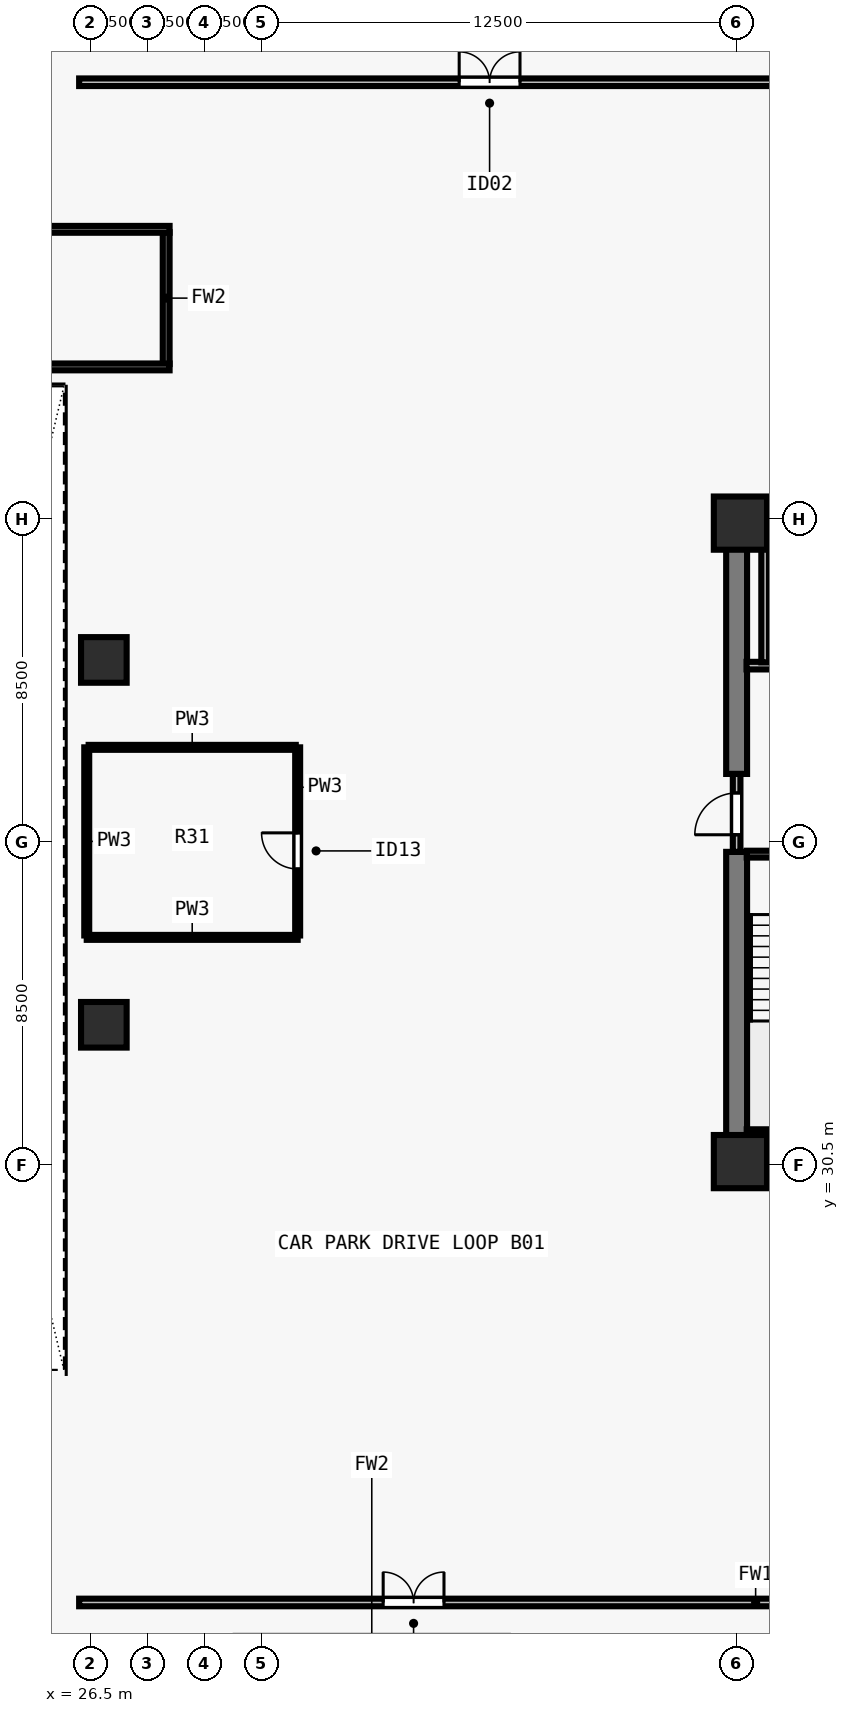
"""IFC4 building model, lengths in metres.
Left out: names, types, materials, properties, quantities, classifications, styles, units other than length and angle.
Written with IfcOpenShell. Run it as: python <this file> out.ifc"""

import sys

from ifc_helpers import new_model, si_unit, direction, frame, frame_2d, origin, origin_2d, place, context, subcontext, project, spatial, rectangle, extrude, element, fill, save


model = new_model("IFC4")
c1 = context("Model", 3, precision=1e-05, world=origin(), true_north=direction((0.0, 1.0)))
c2 = subcontext(c1, "Body", "Model", "MODEL_VIEW")
j1 = project(units=[si_unit("LENGTHUNIT", "METRE"), si_unit("PLANEANGLEUNIT", "RADIAN")], contexts=[c1])
p1 = place(None, origin())
s1 = spatial("IfcSite", under=j1, at=p1, CompositionType="ELEMENT")
p2 = place(p1, origin())
s2 = spatial("IfcBuilding", under=s1, at=p2, CompositionType="ELEMENT")
p3 = place(p2, frame((0.0, 0.0, -4.0)))
s3 = spatial("IfcBuildingStorey", under=s2, at=p3, CompositionType="ELEMENT", Elevation=-4.0)
for number, where, z_axis, x_axis in (
    (1, (43.6, 30.6, 0.0), (0.0, 0.0, 1.0), (1.0, 0.0, 0.0)),
    (2, (43.6, 47.4, 0.0), (0.0, 0.0, 1.0), (1.0, 0.0, 0.0)),
):
    element("IfcColumn", number, at=place(p3, frame(where, z_axis=z_axis, x_axis=x_axis)), inside=s3, PredefinedType="COLUMN", context=c2, shape_type="SweptSolid", body=[
        extrude(rectangle(XDim=1.4, YDim=1.4, at=origin_2d()), origin(), (0.0, 0.0, 1.0), 4.0),
    ])
for number, where, z_axis, x_axis in (
    (3, (26.85, 43.8, 0.0), (0.0, 0.0, 1.0), (1.0, 0.0, 0.0)),
    (4, (26.85, 34.2, 0.0), (0.0, 0.0, 1.0), (1.0, 0.0, 0.0)),
):
    element("IfcColumn", number, at=place(p3, frame(where, z_axis=z_axis, x_axis=x_axis)), inside=s3, PredefinedType="COLUMN", context=c2, shape_type="SweptSolid", body=[
        extrude(rectangle(XDim=1.2, YDim=1.2, at=origin_2d()), origin(), (0.0, 0.0, 1.0), 4.0),
    ])
for number, where, z_axis, x_axis in (
    (5, (43.225, 30.5, 0.0), (0.0, 0.0, 1.0), (1.0, 0.0, 0.0)),
    (6, (43.225, 47.5, 0.0), (0.0, 0.0, 1.0), (1.0, 0.0, 0.0)),
):
    element("IfcWall", number, at=place(p3, frame(where, z_axis=z_axis, x_axis=x_axis)), inside=s3, PredefinedType="SHEAR", context=c2, shape_type="SweptSolid", body=[
        extrude(rectangle(XDim=17.55, YDim=0.55, at=frame_2d((8.775, 0.0))), origin(), (0.0, 0.0, 1.0), 3.7),
    ])
p4 = place(p3, frame((43.5, 30.765, 0.0), z_axis=(0.0, 0.0, 1.0), x_axis=(0.0, 1.0, 0.0)))
e7 = element("IfcWall", 7, at=p4, inside=s3, PredefinedType="SHEAR", context=c2, shape_type="SweptSolid", body=[
    extrude(rectangle(XDim=7.985, YDim=0.55, at=frame_2d((3.993, 0.0))), origin(), (0.0, 0.0, 1.0), 3.7),
])
p5 = place(p3, frame((43.5, 40.8, 0.0), z_axis=(0.0, 0.0, 1.0), x_axis=(0.0, 1.0, 0.0)))
e8 = element("IfcWall", 8, at=p5, inside=s3, PredefinedType="SHEAR", context=c2, shape_type="SweptSolid", body=[
    extrude(rectangle(XDim=6.435, YDim=0.55, at=frame_2d((3.218, 0.0))), origin(), (0.0, 0.0, 1.0), 3.7),
])
p6 = place(p3, frame((43.5, 38.75, 0.0), z_axis=(0.0, 0.0, 1.0), x_axis=(0.0, 1.0, 0.0)))
e9 = element("IfcWall", 9, at=p6, inside=s3, PredefinedType="SOLIDWALL", context=c2, shape_type="SweptSolid", body=[
    extrude(rectangle(XDim=2.05, YDim=0.2, at=frame_2d((1.025, 0.0))), origin(), (0.0, 0.0, 1.0), 3.7),
])
p7 = place(p6, frame((0.45, 0.0, 0.0)))
e10 = element("IfcOpeningElement", 10, at=p7, cuts=e9, PredefinedType="OPENING", context=c2, shape_type="SweptSolid", body=[
    extrude(rectangle(XDim=1.1, YDim=2.15, at=frame_2d((0.55, 1.075))), frame((0.0, 0.11, 0.0), z_axis=(0.0, -1.0, 0.0), x_axis=(1.0, 0.0, 0.0)), (0.0, 0.0, 1.0), 0.22),
])
p8 = place(p3, frame((43.76, 43.65, 0.0), z_axis=(0.0, 0.0, 1.0), x_axis=(1.0, 0.0, 0.0)))
e11 = element("IfcWall", 11, at=p8, inside=s3, PredefinedType="SOLIDWALL", context=c2, shape_type="SweptSolid", body=[
    extrude(rectangle(XDim=3.505, YDim=0.2, at=frame_2d((1.752, 0.0))), origin(), (0.0, 0.0, 1.0), 3.7),
])
p9 = place(p8, frame((1.11, 0.0, 0.0)))
e12 = element("IfcOpeningElement", 12, at=p9, cuts=e11, PredefinedType="OPENING", context=c2, shape_type="SweptSolid", body=[
    extrude(rectangle(XDim=1.1, YDim=2.2, at=frame_2d((0.55, 1.1))), frame((0.0, 0.11, 0.0), z_axis=(0.0, -1.0, 0.0), x_axis=(1.0, 0.0, 0.0)), (0.0, 0.0, 1.0), 0.22),
])
p10 = place(p3, frame((44.25, 43.735, 0.0), z_axis=(0.0, 0.0, 1.0), x_axis=(0.0, 1.0, 0.0)))
e13 = element("IfcWall", 13, at=p10, inside=s3, PredefinedType="SOLIDWALL", context=c2, shape_type="SweptSolid", body=[
    extrude(rectangle(XDim=3.505, YDim=0.2, at=frame_2d((1.752, 0.0))), origin(), (0.0, 0.0, 1.0), 3.7),
])
p11 = place(p3, frame((26.2, 19.0, 0.0), z_axis=(0.0, 0.0, 1.0), x_axis=(1.0, 0.0, 0.0)))
e14 = element("IfcWall", 14, at=p11, inside=s3, PredefinedType="SOLIDWALL", context=c2, shape_type="SweptSolid", body=[
    extrude(rectangle(XDim=51.6, YDim=0.2, at=frame_2d((25.8, 0.0))), origin(), (0.0, 0.0, 1.0), 3.218),
])
p12 = place(p11, frame((8.0, 0.0, 0.0)))
e15 = element("IfcOpeningElement", 15, at=p12, cuts=e14, PredefinedType="OPENING", context=c2, shape_type="SweptSolid", body=[
    extrude(rectangle(XDim=1.6, YDim=2.2, at=frame_2d((0.8, 1.1))), frame((0.0, 0.11, 0.0), z_axis=(0.0, -1.0, 0.0), x_axis=(1.0, 0.0, 0.0)), (0.0, 0.0, 1.0), 0.22),
])
p13 = place(p11, frame((26.0, 0.0, 0.0)))
e16 = element("IfcOpeningElement", 16, at=p13, cuts=e14, PredefinedType="OPENING", context=c2, shape_type="SweptSolid", body=[
    extrude(rectangle(XDim=1.6, YDim=2.2, at=frame_2d((0.8, 1.1))), frame((0.0, 0.11, 0.0), z_axis=(0.0, -1.0, 0.0), x_axis=(1.0, 0.0, 0.0)), (0.0, 0.0, 1.0), 0.22),
])
p14 = place(p11, frame((42.0, 0.0, 0.0)))
e17 = element("IfcOpeningElement", 17, at=p14, cuts=e14, PredefinedType="OPENING", context=c2, shape_type="SweptSolid", body=[
    extrude(rectangle(XDim=1.6, YDim=2.2, at=frame_2d((0.8, 1.1))), frame((0.0, 0.11, 0.0), z_axis=(0.0, -1.0, 0.0), x_axis=(1.0, 0.0, 0.0)), (0.0, 0.0, 1.0), 0.22),
])
p15 = place(p3, frame((26.2, 59.0, 0.0), z_axis=(0.0, 0.0, 1.0), x_axis=(1.0, 0.0, 0.0)))
e18 = element("IfcWall", 18, at=p15, inside=s3, PredefinedType="SOLIDWALL", context=c2, shape_type="SweptSolid", body=[
    extrude(rectangle(XDim=51.6, YDim=0.2, at=frame_2d((25.8, 0.0))), origin(), (0.0, 0.0, 1.0), 3.218),
])
p16 = place(p15, frame((10.0, 0.0, 0.0)))
e19 = element("IfcOpeningElement", 19, at=p16, cuts=e18, PredefinedType="OPENING", context=c2, shape_type="SweptSolid", body=[
    extrude(rectangle(XDim=1.6, YDim=2.2, at=frame_2d((0.8, 1.1))), frame((0.0, 0.11, 0.0), z_axis=(0.0, -1.0, 0.0), x_axis=(1.0, 0.0, 0.0)), (0.0, 0.0, 1.0), 0.22),
])
p17 = place(p15, frame((36.0, 0.0, 0.0)))
e20 = element("IfcOpeningElement", 20, at=p17, cuts=e18, PredefinedType="OPENING", context=c2, shape_type="SweptSolid", body=[
    extrude(rectangle(XDim=1.6, YDim=2.2, at=frame_2d((0.8, 1.1))), frame((0.0, 0.11, 0.0), z_axis=(0.0, -1.0, 0.0), x_axis=(1.0, 0.0, 0.0)), (0.0, 0.0, 1.0), 0.22),
])
p18 = place(p3, frame((26.4, 36.5, 0.0), z_axis=(0.0, 0.0, 1.0), x_axis=(1.0, 0.0, 0.0)))
e21 = element("IfcWall", 21, at=p18, inside=s3, PredefinedType="PLUMBINGWALL", context=c2, shape_type="SweptSolid", body=[
    extrude(rectangle(XDim=5.55, YDim=0.13, at=frame_2d((2.775, 0.0))), origin(), (0.0, 0.0, 1.0), 3.7),
])
p19 = place(p3, frame((26.4, 36.55, 0.0), z_axis=(0.0, 0.0, 1.0), x_axis=(0.0, 1.0, 0.0)))
e22 = element("IfcWall", 22, at=p19, inside=s3, PredefinedType="PLUMBINGWALL", context=c2, shape_type="SweptSolid", body=[
    extrude(rectangle(XDim=4.95, YDim=0.13, at=frame_2d((2.475, 0.0))), origin(), (0.0, 0.0, 1.0), 3.7),
])
p20 = place(p3, frame((31.95, 36.55, 0.0), z_axis=(0.0, 0.0, 1.0), x_axis=(0.0, 1.0, 0.0)))
e23 = element("IfcWall", 23, at=p20, inside=s3, PredefinedType="PLUMBINGWALL", context=c2, shape_type="SweptSolid", body=[
    extrude(rectangle(XDim=4.95, YDim=0.13, at=frame_2d((2.475, 0.0))), origin(), (0.0, 0.0, 1.0), 3.7),
])
p21 = place(p20, frame((1.75, 0.0, 0.0)))
e24 = element("IfcOpeningElement", 24, at=p21, cuts=e23, PredefinedType="OPENING", context=c2, shape_type="SweptSolid", body=[
    extrude(rectangle(XDim=0.95, YDim=2.1, at=frame_2d((0.475, 1.05))), frame((0.0, 0.075, 0.0), z_axis=(0.0, -1.0, 0.0), x_axis=(1.0, 0.0, 0.0)), (0.0, 0.0, 1.0), 0.15),
])
p22 = place(p3, frame((26.45, 41.5, 0.0), z_axis=(0.0, 0.0, 1.0), x_axis=(1.0, 0.0, 0.0)))
e25 = element("IfcWall", 25, at=p22, inside=s3, PredefinedType="PLUMBINGWALL", context=c2, shape_type="SweptSolid", body=[
    extrude(rectangle(XDim=5.45, YDim=0.13, at=frame_2d((2.725, 0.0))), origin(), (0.0, 0.0, 1.0), 3.7),
])
p23 = place(p3, frame((28.49, 51.585, 0.0), z_axis=(0.0, 0.0, 1.0), x_axis=(0.0, 1.0, 0.0)))
e26 = element("IfcWall", 26, at=p23, inside=s3, PredefinedType="SOLIDWALL", context=c2, shape_type="SweptSolid", body=[
    extrude(rectangle(XDim=3.47, YDim=0.18, at=frame_2d((1.735, 0.0))), origin(), (0.0, 0.0, 1.0), 3.7),
])
for number, where, z_axis, x_axis in (
    (27, (21.12, 51.51, 0.0), (0.0, 0.0, 1.0), (1.0, 0.0, 0.0)),
    (28, (21.12, 55.13, 0.0), (0.0, 0.0, 1.0), (1.0, 0.0, 0.0)),
):
    element("IfcWall", number, at=place(p3, frame(where, z_axis=z_axis, x_axis=x_axis)), inside=s3, PredefinedType="SOLIDWALL", context=c2, shape_type="SweptSolid", body=[
        extrude(rectangle(XDim=7.46, YDim=0.18, at=frame_2d((3.73, 0.0))), origin(), (0.0, 0.0, 1.0), 3.7),
    ])
p24 = place(p3, frame((43.765, 38.69, 0.0), z_axis=(0.0, 0.0, 1.0), x_axis=(1.0, 0.0, 0.0)))
e29 = element("IfcWall", 29, at=p24, inside=s3, PredefinedType="SOLIDWALL", context=c2, shape_type="SweptSolid", body=[
    extrude(rectangle(XDim=3.23, YDim=0.18, at=frame_2d((1.615, 0.0))), origin(), (0.0, 0.0, 1.0), 3.7),
])
p25 = place(p24, frame((1.14, 0.0, 0.0)))
e30 = element("IfcOpeningElement", 30, at=p25, cuts=e29, PredefinedType="OPENING", context=c2, shape_type="SweptSolid", body=[
    extrude(rectangle(XDim=0.95, YDim=2.15, at=frame_2d((0.475, 1.075))), frame((0.0, 0.1, 0.0), z_axis=(0.0, -1.0, 0.0), x_axis=(1.0, 0.0, 0.0)), (0.0, 0.0, 1.0), 0.2),
])
p26 = place(p3, frame((43.765, 31.36, 0.0), z_axis=(0.0, 0.0, 1.0), x_axis=(1.0, 0.0, 0.0)))
e31 = element("IfcWall", 31, at=p26, inside=s3, PredefinedType="SOLIDWALL", context=c2, shape_type="SweptSolid", body=[
    extrude(rectangle(XDim=3.23, YDim=0.18, at=frame_2d((1.615, 0.0))), origin(), (0.0, 0.0, 1.0), 3.7),
])
p27 = place(p7, origin())
e32 = element("IfcDoor", 32, at=p27, inside=s3, OperationType="SINGLE_SWING_LEFT", PredefinedType="DOOR", context=c2, shape_type="SweptSolid", body=[
    extrude(rectangle(XDim=1.1, YDim=2.15, at=frame_2d((0.55, 1.075))), frame((0.0, 0.025, 0.0), z_axis=(0.0, -1.0, 0.0), x_axis=(1.0, 0.0, 0.0)), (0.0, 0.0, 1.0), 0.05),
])
fill(e10, e32)
p28 = place(p12, origin())
e33 = element("IfcDoor", 33, at=p28, inside=s3, OperationType="DOUBLE_DOOR_SINGLE_SWING", PredefinedType="DOOR", context=c2, shape_type="SweptSolid", body=[
    extrude(rectangle(XDim=1.6, YDim=2.2, at=frame_2d((0.8, 1.1))), frame((0.0, 0.025, 0.0), z_axis=(0.0, -1.0, 0.0), x_axis=(1.0, 0.0, 0.0)), (0.0, 0.0, 1.0), 0.05),
])
fill(e15, e33)
p29 = place(p16, origin())
e34 = element("IfcDoor", 34, at=p29, inside=s3, OperationType="DOUBLE_DOOR_SINGLE_SWING", PredefinedType="DOOR", context=c2, shape_type="SweptSolid", body=[
    extrude(rectangle(XDim=1.6, YDim=2.2, at=frame_2d((0.8, 1.1))), frame((0.0, 0.025, 0.0), z_axis=(0.0, -1.0, 0.0), x_axis=(1.0, 0.0, 0.0)), (0.0, 0.0, 1.0), 0.05),
])
fill(e19, e34)
p30 = place(p21, origin())
e35 = element("IfcDoor", 35, at=p30, inside=s3, OperationType="SINGLE_SWING_RIGHT", PredefinedType="DOOR", context=c2, shape_type="SweptSolid", body=[
    extrude(rectangle(XDim=0.95, YDim=2.1, at=frame_2d((0.475, 1.05))), frame((0.0, 0.025, 0.0), z_axis=(0.0, -1.0, 0.0), x_axis=(1.0, 0.0, 0.0)), (0.0, 0.0, 1.0), 0.05),
])
fill(e24, e35)
save(model, sys.argv[1])
